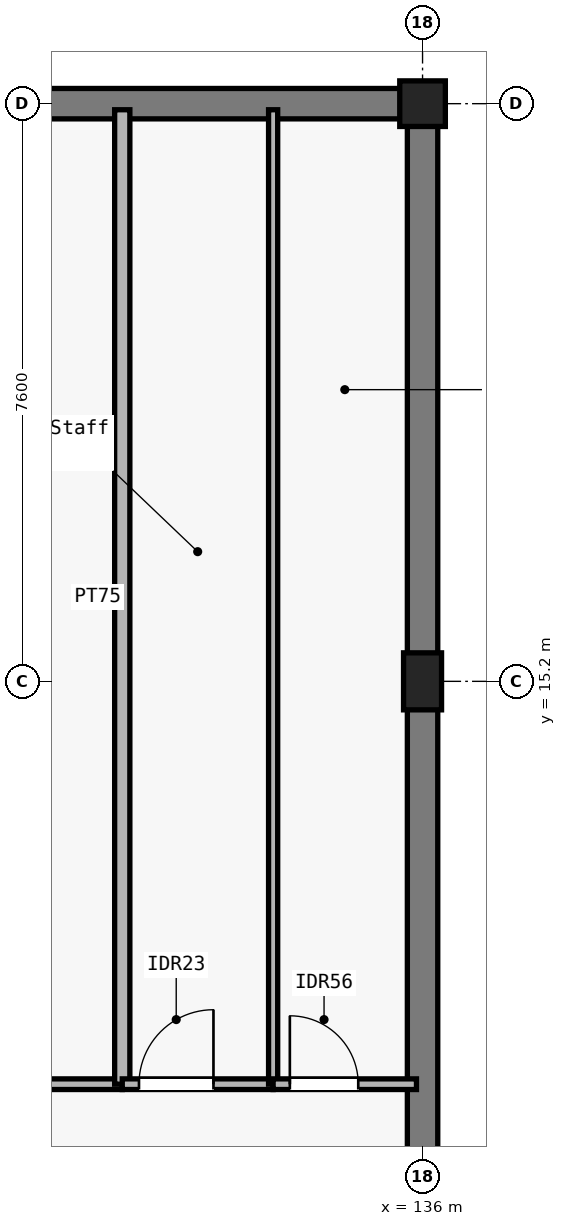
"""IFC4 building model, lengths in metres.
Left out: names, types, materials, properties, quantities, classifications, styles, units other than length and angle.
Written with IfcOpenShell. Run it as: python <this file> out.ifc"""

import sys

from ifc_helpers import new_model, si_unit, direction, frame, frame_2d, origin, origin_2d, place, context, subcontext, project, spatial, rectangle, extrude, element, fill, save


model = new_model("IFC4")
c1 = context("Model", 3, precision=1e-05, world=origin(), true_north=direction((0.0, 1.0)))
c2 = subcontext(c1, "Body", "Model", "MODEL_VIEW")
j1 = project(units=[si_unit("LENGTHUNIT", "METRE"), si_unit("PLANEANGLEUNIT", "RADIAN")], contexts=[c1])
p1 = place(None, origin())
s1 = spatial("IfcSite", under=j1, at=p1, CompositionType="ELEMENT")
p2 = place(p1, origin())
s2 = spatial("IfcBuilding", under=s1, at=p2, CompositionType="ELEMENT")
p3 = place(p2, frame((0.0, 0.0, -5.4)))
s3 = spatial("IfcBuildingStorey", under=s2, at=p3, CompositionType="ELEMENT", Elevation=-5.4)
p4 = place(p3, frame((136.0, 22.8, 0.0), z_axis=(0.0, 0.0, 1.0), x_axis=(-1.0, 0.0, 0.0)))
e1 = element("IfcWall", 1, at=p4, inside=s3, PredefinedType="USERDEFINED", context=c2, shape_type="SweptSolid", body=[
    extrude(rectangle(XDim=8.0, YDim=0.4, at=frame_2d((4.0, 0.0))), origin(), (0.0, 0.0, 1.0), 5.08),
])
p5 = place(p3, frame((136.0, 7.6, 0.0), z_axis=(0.0, 0.0, 1.0), x_axis=(0.0, 1.0, 0.0)))
e2 = element("IfcWall", 2, at=p5, inside=s3, PredefinedType="USERDEFINED", context=c2, shape_type="SweptSolid", body=[
    extrude(rectangle(XDim=7.6, YDim=0.4, at=frame_2d((3.8, 0.0))), origin(), (0.0, 0.0, 1.0), 5.08),
])
p6 = place(p3, frame((136.0, 15.2, 0.0), z_axis=(0.0, 0.0, 1.0), x_axis=(0.0, 1.0, 0.0)))
e3 = element("IfcWall", 3, at=p6, inside=s3, PredefinedType="USERDEFINED", context=c2, shape_type="SweptSolid", body=[
    extrude(rectangle(XDim=7.6, YDim=0.4, at=frame_2d((3.8, 0.0))), origin(), (0.0, 0.0, 1.0), 5.08),
])
p7 = place(p3, frame((136.0, 15.2, 0.0), z_axis=(0.0, 0.0, 1.0), x_axis=(1.0, 0.0, 0.0)))
e4 = element("IfcColumn", 4, at=p7, inside=s3, PredefinedType="COLUMN", context=c2, shape_type="SweptSolid", body=[
    extrude(rectangle(XDim=0.5, YDim=0.75, at=origin_2d()), origin(), (0.0, 0.0, 1.0), 5.4),
])
p8 = place(p3, frame((136.0, 22.8, 0.0), z_axis=(0.0, 0.0, 1.0), x_axis=(1.0, 0.0, 0.0)))
e5 = element("IfcColumn", 5, at=p8, inside=s3, PredefinedType="COLUMN", context=c2, shape_type="SweptSolid", body=[
    extrude(rectangle(XDim=0.6, YDim=0.6, at=origin_2d()), origin(), (0.0, 0.0, 1.0), 5.4),
])
p9 = place(p3, frame((107.739, 9.9, 0.0), z_axis=(0.0, 0.0, 1.0), x_axis=(1.0, 0.0, 0.0)))
e6 = element("IfcWall", 6, at=p9, inside=s3, PredefinedType="PARTITIONING", context=c2, shape_type="SweptSolid", body=[
    extrude(rectangle(XDim=24.31, YDim=0.14, at=frame_2d((12.155, 0.0))), origin(), (0.0, 0.0, 1.0), 4.38),
])
p10 = place(p9, frame((0.22, 0.0, 0.0)))
e7 = element("IfcOpeningElement", 7, at=p10, cuts=e6, PredefinedType="OPENING", context=c2, shape_type="SweptSolid", body=[
    extrude(rectangle(XDim=0.94, YDim=2.05, at=frame_2d((0.47, 1.025))), frame((0.0, 0.08, 0.0), z_axis=(0.0, -1.0, 0.0), x_axis=(1.0, 0.0, 0.0)), (0.0, 0.0, 1.0), 0.16),
])
p11 = place(p3, frame((132.049, 9.9, 0.0), z_axis=(0.0, 0.0, 1.0), x_axis=(0.0, 1.0, 0.0)))
e8 = element("IfcWall", 8, at=p11, inside=s3, PredefinedType="PARTITIONING", context=c2, shape_type="SweptSolid", body=[
    extrude(rectangle(XDim=12.82, YDim=0.2, at=frame_2d((6.41, 0.0))), origin(), (0.0, 0.0, 1.0), 4.305),
])
p12 = place(p3, frame((132.049, 9.9, 0.0), z_axis=(0.0, 0.0, 1.0), x_axis=(1.0, 0.0, 0.0)))
e9 = element("IfcWall", 9, at=p12, inside=s3, PredefinedType="PARTITIONING", context=c2, shape_type="SweptSolid", body=[
    extrude(rectangle(XDim=1.985, YDim=0.14, at=frame_2d((0.992, 0.0))), origin(), (0.0, 0.0, 1.0), 4.495),
])
p13 = place(p12, frame((0.22, 0.0, 0.0)))
e10 = element("IfcOpeningElement", 10, at=p13, cuts=e9, PredefinedType="OPENING", context=c2, shape_type="SweptSolid", body=[
    extrude(rectangle(XDim=0.98, YDim=2.05, at=frame_2d((0.49, 1.025))), frame((0.0, 0.08, 0.0), z_axis=(0.0, -1.0, 0.0), x_axis=(1.0, 0.0, 0.0)), (0.0, 0.0, 1.0), 0.16),
])
p14 = place(p3, frame((134.034, 9.9, 0.0), z_axis=(0.0, 0.0, 1.0), x_axis=(0.0, 1.0, 0.0)))
e11 = element("IfcWall", 11, at=p14, inside=s3, PredefinedType="PARTITIONING", context=c2, shape_type="SweptSolid", body=[
    extrude(rectangle(XDim=12.82, YDim=0.12, at=frame_2d((6.41, 0.0))), origin(), (0.0, 0.0, 1.0), 4.305),
])
p15 = place(p3, frame((134.034, 9.9, 0.0), z_axis=(0.0, 0.0, 1.0), x_axis=(1.0, 0.0, 0.0)))
e12 = element("IfcWall", 12, at=p15, inside=s3, PredefinedType="PARTITIONING", context=c2, shape_type="SweptSolid", body=[
    extrude(rectangle(XDim=1.886, YDim=0.14, at=frame_2d((0.943, 0.0))), origin(), (0.0, 0.0, 1.0), 4.305),
])
p16 = place(p15, frame((0.22, 0.0, 0.0)))
e13 = element("IfcOpeningElement", 13, at=p16, cuts=e12, PredefinedType="OPENING", context=c2, shape_type="SweptSolid", body=[
    extrude(rectangle(XDim=0.9, YDim=2.1, at=frame_2d((0.45, 1.05))), frame((0.0, 0.08, 0.0), z_axis=(0.0, -1.0, 0.0), x_axis=(1.0, 0.0, 0.0)), (0.0, 0.0, 1.0), 0.16),
])
p17 = place(p13, origin())
e14 = element("IfcDoor", 14, at=p17, inside=s3, OperationType="SINGLE_SWING_RIGHT", PredefinedType="DOOR", context=c2, shape_type="SweptSolid", body=[
    extrude(rectangle(XDim=0.98, YDim=2.05, at=frame_2d((0.49, 1.025))), frame((0.0, 0.025, 0.0), z_axis=(0.0, -1.0, 0.0), x_axis=(1.0, 0.0, 0.0)), (0.0, 0.0, 1.0), 0.05),
])
fill(e10, e14)
p18 = place(p16, origin())
e15 = element("IfcDoor", 15, at=p18, inside=s3, OperationType="SINGLE_SWING_LEFT", PredefinedType="DOOR", context=c2, shape_type="SweptSolid", body=[
    extrude(rectangle(XDim=0.9, YDim=2.1, at=frame_2d((0.45, 1.05))), frame((0.0, 0.025, 0.0), z_axis=(0.0, -1.0, 0.0), x_axis=(1.0, 0.0, 0.0)), (0.0, 0.0, 1.0), 0.05),
])
fill(e13, e15)
save(model, sys.argv[1])
